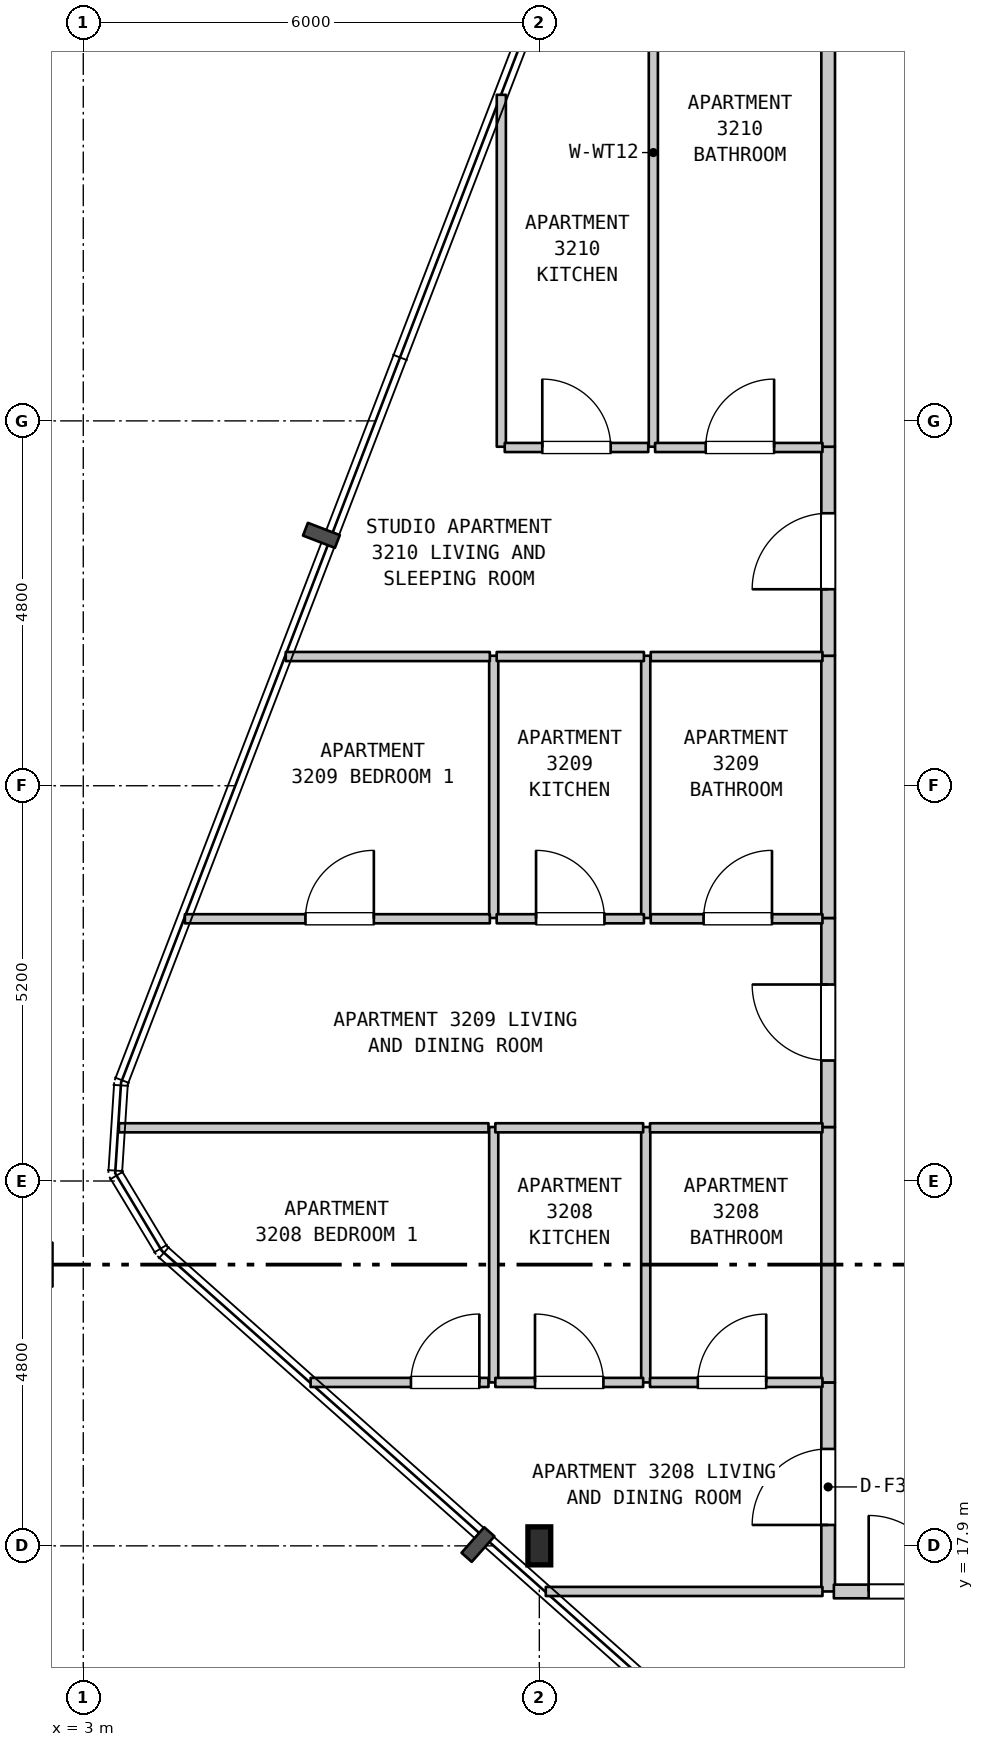
"""IFC4 building model, lengths in metres.
Left out: names, types, materials, properties, quantities, classifications, styles, units other than length and angle.
Written with IfcOpenShell. Run it as: python <this file> out.ifc"""

import sys

from ifc_helpers import new_model, si_unit, direction, frame, frame_2d, origin, origin_2d, place, context, subcontext, project, spatial, rectangle, i_section, extrude, element, fill, save


model = new_model("IFC4")
c1 = context("Model", 3, precision=1e-05, world=origin(), true_north=direction((0.0, 1.0)))
c2 = subcontext(c1, "Body", "Model", "MODEL_VIEW")
j1 = project(units=[si_unit("LENGTHUNIT", "METRE"), si_unit("PLANEANGLEUNIT", "RADIAN")], contexts=[c1])
p1 = place(None, origin())
s1 = spatial("IfcSite", under=j1, at=p1, CompositionType="ELEMENT")
p2 = place(p1, origin())
s2 = spatial("IfcBuilding", under=s1, at=p2, CompositionType="ELEMENT")
p3 = place(p2, frame((0.0, 0.0, 133.5)))
s3 = spatial("IfcBuildingStorey", under=s2, at=p3, CompositionType="ELEMENT", Elevation=133.5)
p4 = place(p3, frame((9.0, 17.9, 0.0), z_axis=(0.0, 0.0, 1.0), x_axis=(1.0, 0.0, 0.0)))
e1 = element("IfcColumn", 1, at=p4, inside=s3, PredefinedType="COLUMN", context=c2, shape_type="SweptSolid", body=[
    extrude(i_section(OverallWidth=0.3, OverallDepth=0.5, WebThickness=0.014, FlangeThickness=0.028, FilletRadius=0.027, at=origin_2d()), origin(), (0.0, 0.0, 1.0), 3.7),
])
p5 = place(p3, frame((8.4, 20.05, 0.0), z_axis=(0.0, 0.0, 1.0), x_axis=(0.0, 1.0, 0.0)))
e2 = element("IfcWall", 2, at=p5, inside=s3, PredefinedType="PARTITIONING", context=c2, shape_type="SweptSolid", body=[
    extrude(rectangle(XDim=3.36, YDim=0.12, at=frame_2d((1.68, 0.0))), origin(), (0.0, 0.0, 1.0), 3.385),
])
p6 = place(p3, frame((8.4, 26.16, 0.0), z_axis=(0.0, 0.0, 1.0), x_axis=(0.0, 1.0, 0.0)))
e3 = element("IfcWall", 3, at=p6, inside=s3, PredefinedType="PARTITIONING", context=c2, shape_type="SweptSolid", body=[
    extrude(rectangle(XDim=3.45, YDim=0.12, at=frame_2d((1.725, 0.0))), origin(), (0.0, 0.0, 1.0), 3.385),
])
p7 = place(p3, frame((8.5, 32.36, 0.0), z_axis=(0.0, 0.0, 1.0), x_axis=(0.0, 1.0, 0.0)))
e4 = element("IfcWall", 4, at=p7, inside=s3, PredefinedType="PARTITIONING", context=c2, shape_type="SweptSolid", body=[
    extrude(rectangle(XDim=4.63, YDim=0.12, at=frame_2d((2.315, 0.0))), origin(), (0.0, 0.0, 1.0), 3.385),
])
p8 = place(p3, frame((10.4, 20.05, 0.0), z_axis=(0.0, 0.0, 1.0), x_axis=(0.0, 1.0, 0.0)))
e5 = element("IfcWall", 5, at=p8, inside=s3, PredefinedType="PARTITIONING", context=c2, shape_type="SweptSolid", body=[
    extrude(rectangle(XDim=3.36, YDim=0.12, at=frame_2d((1.68, 0.0))), origin(), (0.0, 0.0, 1.0), 3.385),
])
p9 = place(p3, frame((10.4, 26.16, 0.0), z_axis=(0.0, 0.0, 1.0), x_axis=(0.0, 1.0, 0.0)))
e6 = element("IfcWall", 6, at=p9, inside=s3, PredefinedType="PARTITIONING", context=c2, shape_type="SweptSolid", body=[
    extrude(rectangle(XDim=3.45, YDim=0.12, at=frame_2d((1.725, 0.0))), origin(), (0.0, 0.0, 1.0), 3.385),
])
p10 = place(p3, frame((10.5, 32.36, 0.0), z_axis=(0.0, 0.0, 1.0), x_axis=(0.0, 1.0, 0.0)))
e7 = element("IfcWall", 7, at=p10, inside=s3, PredefinedType="PARTITIONING", context=c2, shape_type="SweptSolid", body=[
    extrude(rectangle(XDim=7.74, YDim=0.12, at=frame_2d((3.87, 0.0))), origin(), (0.0, 0.0, 1.0), 3.385),
])
p11 = place(p3, frame((12.8, 17.3, 0.0), z_axis=(0.0, 0.0, 1.0), x_axis=(0.0, 1.0, 0.0)))
e8 = element("IfcWall", 8, at=p11, inside=s3, PredefinedType="STANDARD", context=c2, shape_type="SweptSolid", body=[
    extrude(rectangle(XDim=2.75, YDim=0.18, at=frame_2d((1.375, 0.0))), origin(), (0.0, 0.0, 1.0), 3.385),
])
p12 = place(p11, frame((0.875, 0.0, 0.0)))
e9 = element("IfcOpeningElement", 9, at=p12, cuts=e8, PredefinedType="OPENING", context=c2, shape_type="SweptSolid", body=[
    extrude(rectangle(XDim=1.0, YDim=2.15, at=frame_2d((0.5, 1.075))), frame((0.0, 0.1, 0.0), z_axis=(0.0, -1.0, 0.0), x_axis=(1.0, 0.0, 0.0)), (0.0, 0.0, 1.0), 0.2),
])
p13 = place(p3, frame((12.8, 20.05, 0.0), z_axis=(0.0, 0.0, 1.0), x_axis=(0.0, 1.0, 0.0)))
e10 = element("IfcWall", 10, at=p13, inside=s3, PredefinedType="STANDARD", context=c2, shape_type="SweptSolid", body=[
    extrude(rectangle(XDim=3.36, YDim=0.18, at=frame_2d((1.68, 0.0))), origin(), (0.0, 0.0, 1.0), 3.385),
])
p14 = place(p3, frame((12.8, 23.41, 0.0), z_axis=(0.0, 0.0, 1.0), x_axis=(0.0, 1.0, 0.0)))
e11 = element("IfcWall", 11, at=p14, inside=s3, PredefinedType="STANDARD", context=c2, shape_type="SweptSolid", body=[
    extrude(rectangle(XDim=2.75, YDim=0.18, at=frame_2d((1.375, 0.0))), origin(), (0.0, 0.0, 1.0), 3.385),
])
p15 = place(p14, frame((0.875, 0.0, 0.0)))
e12 = element("IfcOpeningElement", 12, at=p15, cuts=e11, PredefinedType="OPENING", context=c2, shape_type="SweptSolid", body=[
    extrude(rectangle(XDim=1.0, YDim=2.15, at=frame_2d((0.5, 1.075))), frame((0.0, 0.1, 0.0), z_axis=(0.0, -1.0, 0.0), x_axis=(1.0, 0.0, 0.0)), (0.0, 0.0, 1.0), 0.2),
])
p16 = place(p3, frame((12.8, 26.16, 0.0), z_axis=(0.0, 0.0, 1.0), x_axis=(0.0, 1.0, 0.0)))
e13 = element("IfcWall", 13, at=p16, inside=s3, PredefinedType="STANDARD", context=c2, shape_type="SweptSolid", body=[
    extrude(rectangle(XDim=3.45, YDim=0.18, at=frame_2d((1.725, 0.0))), origin(), (0.0, 0.0, 1.0), 3.385),
])
p17 = place(p3, frame((12.8, 29.61, 0.0), z_axis=(0.0, 0.0, 1.0), x_axis=(0.0, 1.0, 0.0)))
e14 = element("IfcWall", 14, at=p17, inside=s3, PredefinedType="STANDARD", context=c2, shape_type="SweptSolid", body=[
    extrude(rectangle(XDim=2.75, YDim=0.18, at=frame_2d((1.375, 0.0))), origin(), (0.0, 0.0, 1.0), 3.385),
])
p18 = place(p17, frame((0.875, 0.0, 0.0)))
e15 = element("IfcOpeningElement", 15, at=p18, cuts=e14, PredefinedType="OPENING", context=c2, shape_type="SweptSolid", body=[
    extrude(rectangle(XDim=1.0, YDim=2.15, at=frame_2d((0.5, 1.075))), frame((0.0, 0.1, 0.0), z_axis=(0.0, -1.0, 0.0), x_axis=(1.0, 0.0, 0.0)), (0.0, 0.0, 1.0), 0.2),
])
p19 = place(p3, frame((12.8, 32.36, 0.0), z_axis=(0.0, 0.0, 1.0), x_axis=(0.0, 1.0, 0.0)))
e16 = element("IfcWall", 16, at=p19, inside=s3, PredefinedType="STANDARD", context=c2, shape_type="SweptSolid", body=[
    extrude(rectangle(XDim=7.74, YDim=0.18, at=frame_2d((3.87, 0.0))), origin(), (0.0, 0.0, 1.0), 3.385),
])
p20 = place(p3, frame((9.085, 17.3, 0.0), z_axis=(0.0, 0.0, 1.0), x_axis=(1.0, 0.0, 0.0)))
e17 = element("IfcWall", 17, at=p20, inside=s3, PredefinedType="PARTITIONING", context=c2, shape_type="SweptSolid", body=[
    extrude(rectangle(XDim=3.64, YDim=0.12, at=frame_2d((1.82, 0.0))), origin(), (0.0, 0.0, 1.0), 3.385),
])
p21 = place(p3, frame((12.875, 17.3, 0.0), z_axis=(0.0, 0.0, 1.0), x_axis=(1.0, 0.0, 0.0)))
e18 = element("IfcWall", 18, at=p21, inside=s3, PredefinedType="STANDARD", context=c2, shape_type="SweptSolid", body=[
    extrude(rectangle(XDim=3.78, YDim=0.18, at=frame_2d((1.89, 0.0))), origin(), (0.0, 0.0, 1.0), 3.385),
])
p22 = place(p21, frame((0.458, 0.0, 0.0)))
e19 = element("IfcOpeningElement", 19, at=p22, cuts=e18, PredefinedType="OPENING", context=c2, shape_type="SweptSolid", body=[
    extrude(rectangle(XDim=1.0, YDim=2.15, at=frame_2d((0.5, 1.075))), frame((0.0, 0.1, 0.0), z_axis=(0.0, -1.0, 0.0), x_axis=(1.0, 0.0, 0.0)), (0.0, 0.0, 1.0), 0.2),
])
p23 = place(p3, frame((5.991, 20.05, 0.0), z_axis=(0.0, 0.0, 1.0), x_axis=(1.0, 0.0, 0.0)))
e20 = element("IfcWall", 20, at=p23, inside=s3, PredefinedType="PARTITIONING", context=c2, shape_type="SweptSolid", body=[
    extrude(rectangle(XDim=2.34, YDim=0.12, at=frame_2d((1.17, 0.0))), origin(), (0.0, 0.0, 1.0), 3.385),
])
p24 = place(p23, frame((1.32, 0.0, 0.0)))
e21 = element("IfcOpeningElement", 21, at=p24, cuts=e20, PredefinedType="OPENING", context=c2, shape_type="SweptSolid", body=[
    extrude(rectangle(XDim=0.9, YDim=2.15, at=frame_2d((0.45, 1.075))), frame((0.0, 0.07, 0.0), z_axis=(0.0, -1.0, 0.0), x_axis=(1.0, 0.0, 0.0)), (0.0, 0.0, 1.0), 0.14),
])
p25 = place(p3, frame((8.421, 20.05, 0.0), z_axis=(0.0, 0.0, 1.0), x_axis=(1.0, 0.0, 0.0)))
e22 = element("IfcWall", 22, at=p25, inside=s3, PredefinedType="PARTITIONING", context=c2, shape_type="SweptSolid", body=[
    extrude(rectangle(XDim=1.945, YDim=0.12, at=frame_2d((0.973, 0.0))), origin(), (0.0, 0.0, 1.0), 3.385),
])
p26 = place(p25, frame((0.522, 0.0, 0.0)))
e23 = element("IfcOpeningElement", 23, at=p26, cuts=e22, PredefinedType="OPENING", context=c2, shape_type="SweptSolid", body=[
    extrude(rectangle(XDim=0.9, YDim=2.15, at=frame_2d((0.45, 1.075))), frame((0.0, 0.07, 0.0), z_axis=(0.0, -1.0, 0.0), x_axis=(1.0, 0.0, 0.0)), (0.0, 0.0, 1.0), 0.14),
])
p27 = place(p3, frame((10.456, 20.05, 0.0), z_axis=(0.0, 0.0, 1.0), x_axis=(1.0, 0.0, 0.0)))
e24 = element("IfcWall", 24, at=p27, inside=s3, PredefinedType="PARTITIONING", context=c2, shape_type="SweptSolid", body=[
    extrude(rectangle(XDim=2.269, YDim=0.12, at=frame_2d((1.135, 0.0))), origin(), (0.0, 0.0, 1.0), 3.385),
])
p28 = place(p27, frame((0.629, 0.0, 0.0)))
e25 = element("IfcOpeningElement", 25, at=p28, cuts=e24, PredefinedType="OPENING", context=c2, shape_type="SweptSolid", body=[
    extrude(rectangle(XDim=0.9, YDim=2.1, at=frame_2d((0.45, 1.05))), frame((0.0, 0.07, 0.0), z_axis=(0.0, -1.0, 0.0), x_axis=(1.0, 0.0, 0.0)), (0.0, 0.0, 1.0), 0.14),
])
p29 = place(p3, frame((3.469, 23.4, 0.0), z_axis=(0.0, 0.0, 1.0), x_axis=(1.0, 0.0, 0.0)))
e26 = element("IfcWall", 26, at=p29, inside=s3, PredefinedType="PARTITIONING", context=c2, shape_type="SweptSolid", body=[
    extrude(rectangle(XDim=4.862, YDim=0.12, at=frame_2d((2.431, 0.0))), origin(), (0.0, 0.0, 1.0), 3.385),
])
p30 = place(p3, frame((8.421, 23.4, 0.0), z_axis=(0.0, 0.0, 1.0), x_axis=(1.0, 0.0, 0.0)))
e27 = element("IfcWall", 27, at=p30, inside=s3, PredefinedType="PARTITIONING", context=c2, shape_type="SweptSolid", body=[
    extrude(rectangle(XDim=1.945, YDim=0.12, at=frame_2d((0.973, 0.0))), origin(), (0.0, 0.0, 1.0), 3.385),
])
p31 = place(p3, frame((10.456, 23.4, 0.0), z_axis=(0.0, 0.0, 1.0), x_axis=(1.0, 0.0, 0.0)))
e28 = element("IfcWall", 28, at=p31, inside=s3, PredefinedType="PARTITIONING", context=c2, shape_type="SweptSolid", body=[
    extrude(rectangle(XDim=2.269, YDim=0.12, at=frame_2d((1.135, 0.0))), origin(), (0.0, 0.0, 1.0), 3.385),
])
p32 = place(p3, frame((4.337, 26.15, 0.0), z_axis=(0.0, 0.0, 1.0), x_axis=(1.0, 0.0, 0.0)))
e29 = element("IfcWall", 29, at=p32, inside=s3, PredefinedType="PARTITIONING", context=c2, shape_type="SweptSolid", body=[
    extrude(rectangle(XDim=4.012, YDim=0.12, at=frame_2d((2.006, 0.0))), origin(), (0.0, 0.0, 1.0), 3.385),
])
p33 = place(p32, frame((1.586, 0.0, 0.0)))
e30 = element("IfcOpeningElement", 30, at=p33, cuts=e29, PredefinedType="OPENING", context=c2, shape_type="SweptSolid", body=[
    extrude(rectangle(XDim=0.9, YDim=2.15, at=frame_2d((0.45, 1.075))), frame((0.0, 0.07, 0.0), z_axis=(0.0, -1.0, 0.0), x_axis=(1.0, 0.0, 0.0)), (0.0, 0.0, 1.0), 0.14),
])
p34 = place(p3, frame((8.439, 26.15, 0.0), z_axis=(0.0, 0.0, 1.0), x_axis=(1.0, 0.0, 0.0)))
e31 = element("IfcWall", 31, at=p34, inside=s3, PredefinedType="PARTITIONING", context=c2, shape_type="SweptSolid", body=[
    extrude(rectangle(XDim=1.937, YDim=0.12, at=frame_2d((0.969, 0.0))), origin(), (0.0, 0.0, 1.0), 3.385),
])
p35 = place(p34, frame((0.518, 0.0, 0.0)))
e32 = element("IfcOpeningElement", 32, at=p35, cuts=e31, PredefinedType="OPENING", context=c2, shape_type="SweptSolid", body=[
    extrude(rectangle(XDim=0.9, YDim=2.15, at=frame_2d((0.45, 1.075))), frame((0.0, 0.07, 0.0), z_axis=(0.0, -1.0, 0.0), x_axis=(1.0, 0.0, 0.0)), (0.0, 0.0, 1.0), 0.14),
])
p36 = place(p3, frame((10.466, 26.15, 0.0), z_axis=(0.0, 0.0, 1.0), x_axis=(1.0, 0.0, 0.0)))
e33 = element("IfcWall", 33, at=p36, inside=s3, PredefinedType="PARTITIONING", context=c2, shape_type="SweptSolid", body=[
    extrude(rectangle(XDim=2.259, YDim=0.12, at=frame_2d((1.129, 0.0))), origin(), (0.0, 0.0, 1.0), 3.385),
])
p37 = place(p36, frame((0.695, 0.0, 0.0)))
e34 = element("IfcOpeningElement", 34, at=p37, cuts=e33, PredefinedType="OPENING", context=c2, shape_type="SweptSolid", body=[
    extrude(rectangle(XDim=0.9, YDim=2.1, at=frame_2d((0.45, 1.05))), frame((0.0, 0.07, 0.0), z_axis=(0.0, -1.0, 0.0), x_axis=(1.0, 0.0, 0.0)), (0.0, 0.0, 1.0), 0.14),
])
p38 = place(p3, frame((5.664, 29.6, 0.0), z_axis=(0.0, 0.0, 1.0), x_axis=(1.0, 0.0, 0.0)))
e35 = element("IfcWall", 35, at=p38, inside=s3, PredefinedType="PARTITIONING", context=c2, shape_type="SweptSolid", body=[
    extrude(rectangle(XDim=2.685, YDim=0.12, at=frame_2d((1.343, 0.0))), origin(), (0.0, 0.0, 1.0), 3.385),
])
p39 = place(p3, frame((8.439, 29.6, 0.0), z_axis=(0.0, 0.0, 1.0), x_axis=(1.0, 0.0, 0.0)))
e36 = element("IfcWall", 36, at=p39, inside=s3, PredefinedType="PARTITIONING", context=c2, shape_type="SweptSolid", body=[
    extrude(rectangle(XDim=1.937, YDim=0.12, at=frame_2d((0.969, 0.0))), origin(), (0.0, 0.0, 1.0), 3.385),
])
p40 = place(p3, frame((10.466, 29.6, 0.0), z_axis=(0.0, 0.0, 1.0), x_axis=(1.0, 0.0, 0.0)))
e37 = element("IfcWall", 37, at=p40, inside=s3, PredefinedType="PARTITIONING", context=c2, shape_type="SweptSolid", body=[
    extrude(rectangle(XDim=2.259, YDim=0.12, at=frame_2d((1.129, 0.0))), origin(), (0.0, 0.0, 1.0), 3.385),
])
p41 = place(p3, frame((8.545, 32.35, 0.0), z_axis=(0.0, 0.0, 1.0), x_axis=(1.0, 0.0, 0.0)))
e38 = element("IfcWall", 38, at=p41, inside=s3, PredefinedType="PARTITIONING", context=c2, shape_type="SweptSolid", body=[
    extrude(rectangle(XDim=1.888, YDim=0.12, at=frame_2d((0.944, 0.0))), origin(), (0.0, 0.0, 1.0), 3.385),
])
p42 = place(p41, frame((0.494, 0.0, 0.0)))
e39 = element("IfcOpeningElement", 39, at=p42, cuts=e38, PredefinedType="OPENING", context=c2, shape_type="SweptSolid", body=[
    extrude(rectangle(XDim=0.9, YDim=2.15, at=frame_2d((0.45, 1.075))), frame((0.0, 0.07, 0.0), z_axis=(0.0, -1.0, 0.0), x_axis=(1.0, 0.0, 0.0)), (0.0, 0.0, 1.0), 0.14),
])
p43 = place(p3, frame((10.523, 32.35, 0.0), z_axis=(0.0, 0.0, 1.0), x_axis=(1.0, 0.0, 0.0)))
e40 = element("IfcWall", 40, at=p43, inside=s3, PredefinedType="PARTITIONING", context=c2, shape_type="SweptSolid", body=[
    extrude(rectangle(XDim=2.202, YDim=0.12, at=frame_2d((1.101, 0.0))), origin(), (0.0, 0.0, 1.0), 3.385),
])
p44 = place(p43, frame((0.666, 0.0, 0.0)))
e41 = element("IfcOpeningElement", 41, at=p44, cuts=e40, PredefinedType="OPENING", context=c2, shape_type="SweptSolid", body=[
    extrude(rectangle(XDim=0.9, YDim=2.1, at=frame_2d((0.45, 1.05))), frame((0.0, 0.07, 0.0), z_axis=(0.0, -1.0, 0.0), x_axis=(1.0, 0.0, 0.0)), (0.0, 0.0, 1.0), 0.14),
])
p45 = place(p12, origin())
e42 = element("IfcDoor", 42, at=p45, inside=s3, OperationType="SINGLE_SWING_LEFT", PredefinedType="DOOR", context=c2, shape_type="SweptSolid", body=[
    extrude(rectangle(XDim=1.0, YDim=2.15, at=frame_2d((0.5, 1.075))), frame((0.0, 0.025, 0.0), z_axis=(0.0, -1.0, 0.0), x_axis=(1.0, 0.0, 0.0)), (0.0, 0.0, 1.0), 0.05),
])
fill(e9, e42)
p46 = place(p15, origin())
e43 = element("IfcDoor", 43, at=p46, inside=s3, OperationType="SINGLE_SWING_RIGHT", PredefinedType="DOOR", context=c2, shape_type="SweptSolid", body=[
    extrude(rectangle(XDim=1.0, YDim=2.15, at=frame_2d((0.5, 1.075))), frame((0.0, 0.025, 0.0), z_axis=(0.0, -1.0, 0.0), x_axis=(1.0, 0.0, 0.0)), (0.0, 0.0, 1.0), 0.05),
])
fill(e12, e43)
p47 = place(p18, origin())
e44 = element("IfcDoor", 44, at=p47, inside=s3, OperationType="SINGLE_SWING_LEFT", PredefinedType="DOOR", context=c2, shape_type="SweptSolid", body=[
    extrude(rectangle(XDim=1.0, YDim=2.15, at=frame_2d((0.5, 1.075))), frame((0.0, 0.025, 0.0), z_axis=(0.0, -1.0, 0.0), x_axis=(1.0, 0.0, 0.0)), (0.0, 0.0, 1.0), 0.05),
])
fill(e15, e44)
p48 = place(p22, origin())
e45 = element("IfcDoor", 45, at=p48, inside=s3, OperationType="SINGLE_SWING_LEFT", PredefinedType="DOOR", context=c2, shape_type="SweptSolid", body=[
    extrude(rectangle(XDim=1.0, YDim=2.15, at=frame_2d((0.5, 1.075))), frame((0.0, 0.025, 0.0), z_axis=(0.0, -1.0, 0.0), x_axis=(1.0, 0.0, 0.0)), (0.0, 0.0, 1.0), 0.05),
])
fill(e19, e45)
p49 = place(p24, origin())
e46 = element("IfcDoor", 46, at=p49, inside=s3, OperationType="SINGLE_SWING_RIGHT", PredefinedType="DOOR", context=c2, shape_type="SweptSolid", body=[
    extrude(rectangle(XDim=0.9, YDim=2.15, at=frame_2d((0.45, 1.075))), frame((0.0, 0.025, 0.0), z_axis=(0.0, -1.0, 0.0), x_axis=(1.0, 0.0, 0.0)), (0.0, 0.0, 1.0), 0.05),
])
fill(e21, e46)
p50 = place(p26, origin())
e47 = element("IfcDoor", 47, at=p50, inside=s3, OperationType="SINGLE_SWING_LEFT", PredefinedType="DOOR", context=c2, shape_type="SweptSolid", body=[
    extrude(rectangle(XDim=0.9, YDim=2.15, at=frame_2d((0.45, 1.075))), frame((0.0, 0.025, 0.0), z_axis=(0.0, -1.0, 0.0), x_axis=(1.0, 0.0, 0.0)), (0.0, 0.0, 1.0), 0.05),
])
fill(e23, e47)
p51 = place(p28, origin())
e48 = element("IfcDoor", 48, at=p51, inside=s3, OperationType="SINGLE_SWING_RIGHT", PredefinedType="DOOR", context=c2, shape_type="SweptSolid", body=[
    extrude(rectangle(XDim=0.9, YDim=2.1, at=frame_2d((0.45, 1.05))), frame((0.0, 0.025, 0.0), z_axis=(0.0, -1.0, 0.0), x_axis=(1.0, 0.0, 0.0)), (0.0, 0.0, 1.0), 0.05),
])
fill(e25, e48)
p52 = place(p33, origin())
e49 = element("IfcDoor", 49, at=p52, inside=s3, OperationType="SINGLE_SWING_RIGHT", PredefinedType="DOOR", context=c2, shape_type="SweptSolid", body=[
    extrude(rectangle(XDim=0.9, YDim=2.15, at=frame_2d((0.45, 1.075))), frame((0.0, 0.025, 0.0), z_axis=(0.0, -1.0, 0.0), x_axis=(1.0, 0.0, 0.0)), (0.0, 0.0, 1.0), 0.05),
])
fill(e30, e49)
p53 = place(p35, origin())
e50 = element("IfcDoor", 50, at=p53, inside=s3, OperationType="SINGLE_SWING_LEFT", PredefinedType="DOOR", context=c2, shape_type="SweptSolid", body=[
    extrude(rectangle(XDim=0.9, YDim=2.15, at=frame_2d((0.45, 1.075))), frame((0.0, 0.025, 0.0), z_axis=(0.0, -1.0, 0.0), x_axis=(1.0, 0.0, 0.0)), (0.0, 0.0, 1.0), 0.05),
])
fill(e32, e50)
p54 = place(p37, origin())
e51 = element("IfcDoor", 51, at=p54, inside=s3, OperationType="SINGLE_SWING_RIGHT", PredefinedType="DOOR", context=c2, shape_type="SweptSolid", body=[
    extrude(rectangle(XDim=0.9, YDim=2.1, at=frame_2d((0.45, 1.05))), frame((0.0, 0.025, 0.0), z_axis=(0.0, -1.0, 0.0), x_axis=(1.0, 0.0, 0.0)), (0.0, 0.0, 1.0), 0.05),
])
fill(e34, e51)
p55 = place(p42, origin())
e52 = element("IfcDoor", 52, at=p55, inside=s3, OperationType="SINGLE_SWING_LEFT", PredefinedType="DOOR", context=c2, shape_type="SweptSolid", body=[
    extrude(rectangle(XDim=0.9, YDim=2.15, at=frame_2d((0.45, 1.075))), frame((0.0, 0.025, 0.0), z_axis=(0.0, -1.0, 0.0), x_axis=(1.0, 0.0, 0.0)), (0.0, 0.0, 1.0), 0.05),
])
fill(e39, e52)
p56 = place(p44, origin())
e53 = element("IfcDoor", 53, at=p56, inside=s3, OperationType="SINGLE_SWING_RIGHT", PredefinedType="DOOR", context=c2, shape_type="SweptSolid", body=[
    extrude(rectangle(XDim=0.9, YDim=2.1, at=frame_2d((0.45, 1.05))), frame((0.0, 0.025, 0.0), z_axis=(0.0, -1.0, 0.0), x_axis=(1.0, 0.0, 0.0)), (0.0, 0.0, 1.0), 0.05),
])
fill(e41, e53)
save(model, sys.argv[1])
